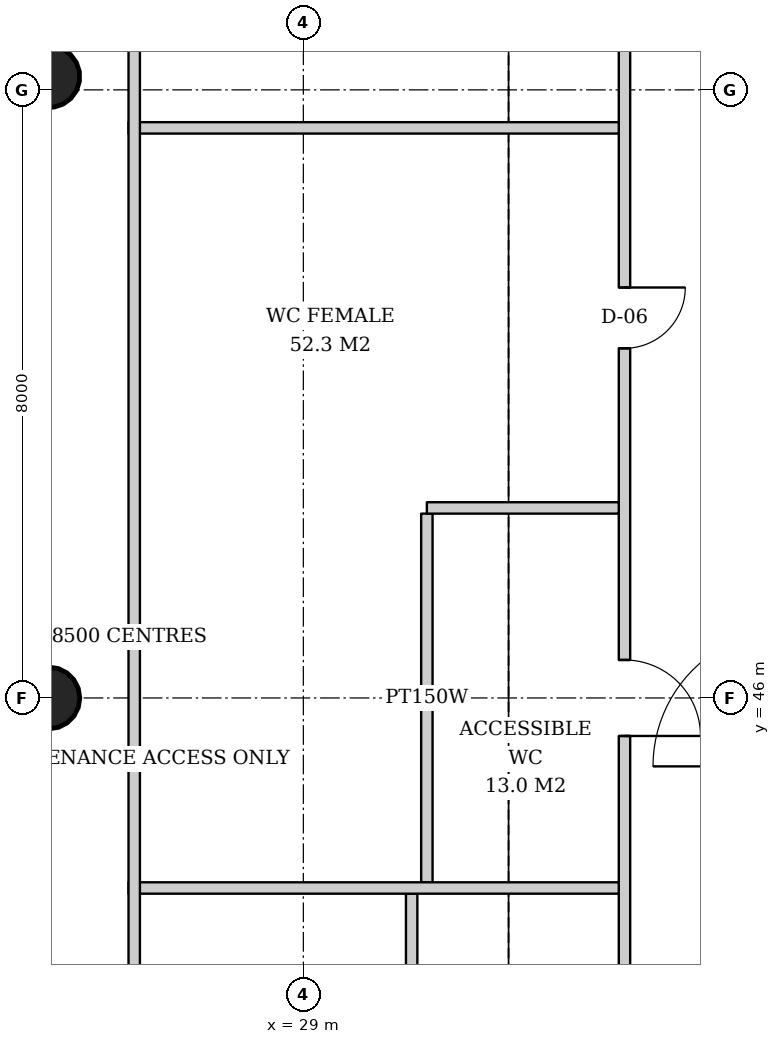
"""IFC4 building model, lengths in metres.
Left out: names, types, materials, properties, quantities, classifications, styles, units other than length and angle.
Written with IfcOpenShell. Run it as: python <this file> out.ifc"""

import sys

from ifc_helpers import new_model, si_unit, direction, frame, frame_2d, origin, origin_2d, place, context, subcontext, project, spatial, rectangle, hollow_circle, extrude, element, fill, save


model = new_model("IFC4")
c1 = context("Model", 3, precision=1e-05, world=origin(), true_north=direction((0.0, 1.0)))
c2 = subcontext(c1, "Body", "Model", "MODEL_VIEW")
j1 = project(units=[si_unit("LENGTHUNIT", "METRE"), si_unit("PLANEANGLEUNIT", "RADIAN")], contexts=[c1])
p1 = place(None, origin())
s1 = spatial("IfcSite", under=j1, at=p1, CompositionType="ELEMENT")
p2 = place(p1, origin())
s2 = spatial("IfcBuilding", under=s1, at=p2, CompositionType="ELEMENT")
p3 = place(p2, frame((0.0, 0.0, 165.4)))
s3 = spatial("IfcBuildingStorey", under=s2, at=p3, CompositionType="ELEMENT", Elevation=165.4)
p4 = place(p3, frame((25.614, 54.193, 0.0), z_axis=(0.031910269556, -0.015987237665, 0.999362868496), x_axis=(0.447933021895, 0.894067115991, 0.0)))
e1 = element("IfcColumn", 1, at=p4, inside=s3, PredefinedType="COLUMN", context=c2, shape_type="SweptSolid", body=[
    extrude(hollow_circle(Radius=0.406, WallThickness=0.03, at=origin_2d()), origin(), (0.0, 0.0, 1.0), 3.802),
])
p5 = place(p3, frame((25.614, 46.0, 0.0), z_axis=(0.031914348339, 0.0, 0.999490607445), x_axis=(0.0, 1.0, 0.0)))
e2 = element("IfcColumn", 2, at=p5, inside=s3, PredefinedType="COLUMN", context=c2, shape_type="SweptSolid", body=[
    extrude(hollow_circle(Radius=0.406, WallThickness=0.03, at=origin_2d()), origin(), (0.0, 0.0, 1.0), 3.802),
])
for number, where, z_axis, x_axis in (
    (3, (30.625, 48.425, 0.0), (0.0, 0.0, 1.0), (0.0, -1.0, 0.0)),
    (4, (30.425, 43.425, 0.0), (0.0, 0.0, 1.0), (0.0, -1.0, 0.0)),
):
    element("IfcWall", number, at=place(p3, frame(where, z_axis=z_axis, x_axis=x_axis)), inside=s3, PredefinedType="PARTITIONING", context=c2, shape_type="SweptSolid", body=[
        extrude(rectangle(XDim=4.85, YDim=0.15, at=frame_2d((2.425, 0.0))), origin(), (0.0, 0.0, 1.0), 2.85),
    ])
p6 = place(p3, frame((33.225, 57.85, 0.0), z_axis=(0.0, 0.0, 1.0), x_axis=(0.0, -1.0, 0.0)))
e5 = element("IfcWall", 5, at=p6, inside=s3, PredefinedType="PARTITIONING", context=c2, shape_type="SweptSolid", body=[
    extrude(rectangle(XDim=23.55, YDim=0.15, at=frame_2d((11.775, 0.0))), origin(), (0.0, 0.0, 1.0), 2.85),
])
p7 = place(p6, frame((6.45, 0.0, 0.0)))
e6 = element("IfcOpeningElement", 6, at=p7, cuts=e5, PredefinedType="OPENING", context=c2, shape_type="SweptSolid", body=[
    extrude(rectangle(XDim=0.8, YDim=2.1, at=frame_2d((0.4, 1.05))), frame((0.0, 0.085, 0.0), z_axis=(0.0, -1.0, 0.0), x_axis=(1.0, 0.0, 0.0)), (0.0, 0.0, 1.0), 0.17),
])
p8 = place(p6, frame((11.35, 0.0, 0.0)))
e7 = element("IfcOpeningElement", 7, at=p8, cuts=e5, PredefinedType="OPENING", context=c2, shape_type="SweptSolid", body=[
    extrude(rectangle(XDim=1.0, YDim=2.1, at=frame_2d((0.5, 1.05))), frame((0.0, 0.085, 0.0), z_axis=(0.0, -1.0, 0.0), x_axis=(1.0, 0.0, 0.0)), (0.0, 0.0, 1.0), 0.17),
])
p9 = place(p6, frame((16.45, 0.0, 0.0)))
e8 = element("IfcOpeningElement", 8, at=p9, cuts=e5, PredefinedType="OPENING", context=c2, shape_type="SweptSolid", body=[
    extrude(rectangle(XDim=0.8, YDim=2.1, at=frame_2d((0.4, 1.05))), frame((0.0, 0.085, 0.0), z_axis=(0.0, -1.0, 0.0), x_axis=(1.0, 0.0, 0.0)), (0.0, 0.0, 1.0), 0.17),
])
p10 = place(p6, frame((1.3, 0.0, 0.0)))
e9 = element("IfcOpeningElement", 9, at=p10, cuts=e5, PredefinedType="OPENING", context=c2, shape_type="SweptSolid", body=[
    extrude(rectangle(XDim=1.8, YDim=2.4, at=frame_2d((0.9, 1.2))), frame((0.0, 0.085, 0.0), z_axis=(0.0, -1.0, 0.0), x_axis=(1.0, 0.0, 0.0)), (0.0, 0.0, 1.0), 0.17),
])
p11 = place(p3, frame((33.15, 53.5, 0.0), z_axis=(0.0, 0.0, 1.0), x_axis=(-1.0, 0.0, 0.0)))
e10 = element("IfcWall", 10, at=p11, inside=s3, PredefinedType="PARTITIONING", context=c2, shape_type="SweptSolid", body=[
    extrude(rectangle(XDim=6.45, YDim=0.15, at=frame_2d((3.225, 0.0))), origin(), (0.0, 0.0, 1.0), 3.62),
])
p12 = place(p3, frame((33.15, 48.5, 0.0), z_axis=(0.0, 0.0, 1.0), x_axis=(-1.0, 0.0, 0.0)))
e11 = element("IfcWall", 11, at=p12, inside=s3, PredefinedType="PARTITIONING", context=c2, shape_type="SweptSolid", body=[
    extrude(rectangle(XDim=2.525, YDim=0.15, at=frame_2d((1.262, 0.0))), origin(), (0.0, 0.0, 1.0), 3.62),
])
p13 = place(p3, frame((33.15, 43.5, 0.0), z_axis=(0.0, 0.0, 1.0), x_axis=(-1.0, 0.0, 0.0)))
e12 = element("IfcWall", 12, at=p13, inside=s3, PredefinedType="PARTITIONING", context=c2, shape_type="SweptSolid", body=[
    extrude(rectangle(XDim=6.45, YDim=0.15, at=frame_2d((3.225, 0.0))), origin(), (0.0, 0.0, 1.0), 3.62),
])
p14 = place(p3, frame((26.775, 30.7, 0.0), z_axis=(0.0, 0.0, 1.0), x_axis=(0.0, 1.0, 0.0)))
e13 = element("IfcWall", 13, at=p14, inside=s3, PredefinedType="PARTITIONING", context=c2, shape_type="SweptSolid", body=[
    extrude(rectangle(XDim=30.6, YDim=0.15, at=frame_2d((15.3, 0.0))), origin(), (0.0, 0.0, 1.0), 2.85),
])
p15 = place(p7, origin())
e14 = element("IfcDoor", 14, at=p15, inside=s3, OperationType="SINGLE_SWING_LEFT", PredefinedType="DOOR", context=c2, shape_type="SweptSolid", body=[
    extrude(rectangle(XDim=0.8, YDim=2.1, at=frame_2d((0.4, 1.05))), frame((0.0, 0.025, 0.0), z_axis=(0.0, -1.0, 0.0), x_axis=(1.0, 0.0, 0.0)), (0.0, 0.0, 1.0), 0.05),
])
fill(e6, e14)
p16 = place(p8, origin())
e15 = element("IfcDoor", 15, at=p16, inside=s3, OperationType="SINGLE_SWING_RIGHT", PredefinedType="DOOR", context=c2, shape_type="SweptSolid", body=[
    extrude(rectangle(XDim=1.0, YDim=2.1, at=frame_2d((0.5, 1.05))), frame((0.0, 0.025, 0.0), z_axis=(0.0, -1.0, 0.0), x_axis=(1.0, 0.0, 0.0)), (0.0, 0.0, 1.0), 0.05),
])
fill(e7, e15)
save(model, sys.argv[1])
